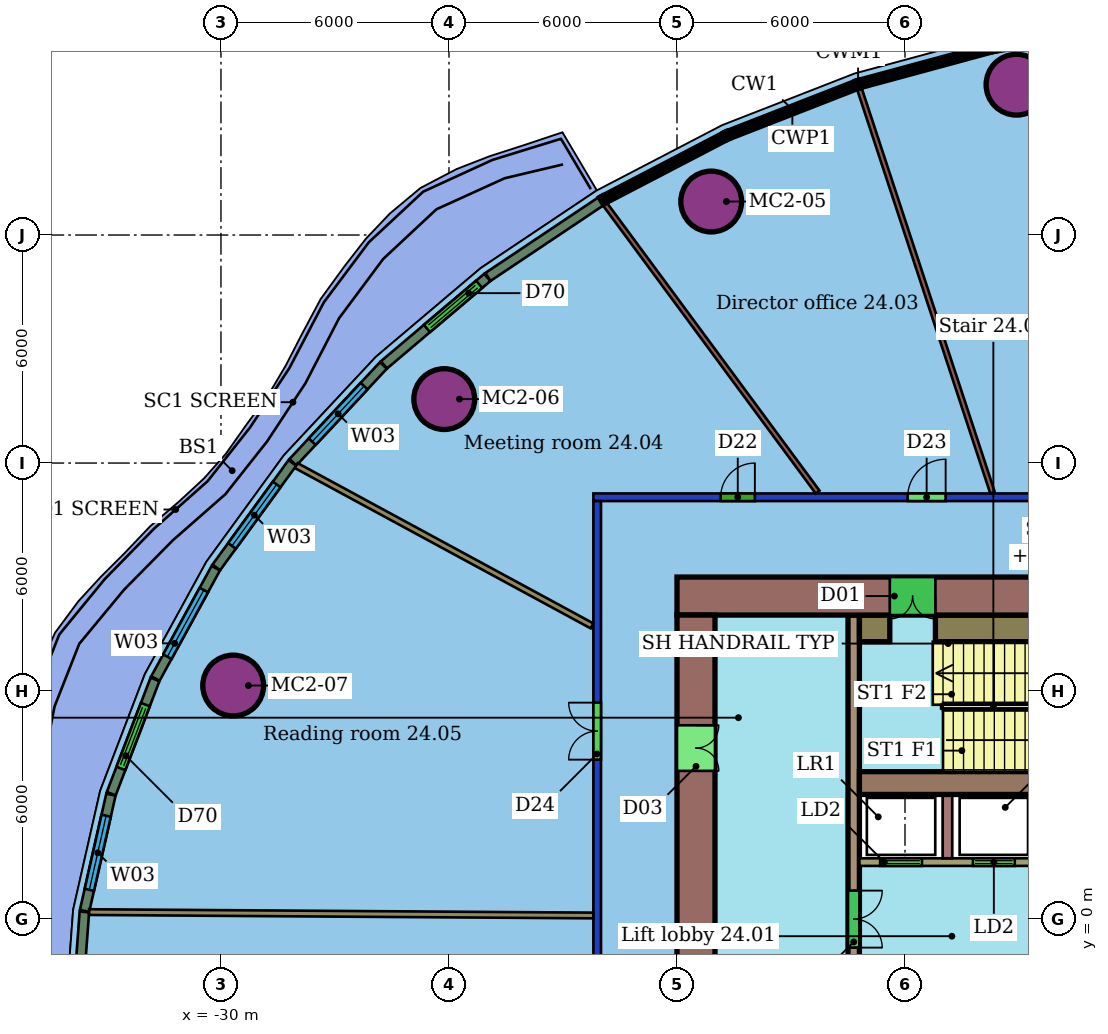
"""IFC4 building model, lengths in metres.
Left out: names, types, materials, properties, quantities, classifications, styles, units other than length and angle.
Written with IfcOpenShell. Run it as: python <this file> out.ifc"""

import sys

from ifc_helpers import new_model, si_unit, direction, frame, frame_2d, origin, origin_2d, place, context, subcontext, project, spatial, rectangle, hollow_circle, extrude, element, fill, save


model = new_model("IFC4")
c1 = context("Model", 3, precision=1e-05, world=origin(), true_north=direction((0.0, 1.0)))
c2 = subcontext(c1, "Body", "Model", "MODEL_VIEW")
j1 = project(units=[si_unit("LENGTHUNIT", "METRE"), si_unit("PLANEANGLEUNIT", "RADIAN")], contexts=[c1])
p1 = place(None, origin())
s1 = spatial("IfcSite", under=j1, at=p1, CompositionType="ELEMENT")
p2 = place(p1, origin())
s2 = spatial("IfcBuilding", under=s1, at=p2, CompositionType="ELEMENT")
p3 = place(p2, frame((0.0, 0.0, 106.6)))
s3 = spatial("IfcBuildingStorey", under=s2, at=p3, CompositionType="ELEMENT", Elevation=106.6)
for number, where, z_axis, x_axis in (
    (1, (-9.066, 21.956, 0.0), (0.0, 0.0, 1.0), (1.0, 0.0, 0.0)),
    (2, (-17.1, 18.881, 0.0), (0.0, 0.0, 1.0), (1.0, 0.0, 0.0)),
    (3, (-24.125, 13.683, 0.0), (0.0, 0.0, 1.0), (1.0, 0.0, 0.0)),
    (4, (-29.679, 6.146, 0.0), (0.0, 0.0, 1.0), (1.0, 0.0, 0.0)),
):
    element("IfcColumn", number, at=place(p3, frame(where, z_axis=z_axis, x_axis=x_axis)), inside=s3, PredefinedType="COLUMN", context=c2, shape_type="SweptSolid", body=[
        extrude(hollow_circle(Radius=0.8, WallThickness=0.055, at=origin_2d()), origin(), (0.0, 0.0, 1.0), 3.45),
    ])
p4 = place(p3, frame((-20.1, -11.0, 0.0), z_axis=(0.0, 0.0, 1.0), x_axis=(0.0, 1.0, 0.0)))
e5 = element("IfcWall", 5, at=p4, inside=s3, PredefinedType="PARTITIONING", context=c2, shape_type="SweptSolid", body=[
    extrude(rectangle(XDim=22.0, YDim=0.2, at=frame_2d((11.0, 0.0))), origin(), (0.0, 0.0, 1.0), 3.0),
])
p5 = place(p4, frame((15.196, 0.0, 0.0)))
e6 = element("IfcOpeningElement", 6, at=p5, cuts=e5, PredefinedType="OPENING", context=c2, shape_type="SweptSolid", body=[
    extrude(rectangle(XDim=1.5, YDim=2.1, at=frame_2d((0.75, 1.05))), frame((0.0, 0.11, 0.0), z_axis=(0.0, -1.0, 0.0), x_axis=(1.0, 0.0, 0.0)), (0.0, 0.0, 1.0), 0.22),
])
p6 = place(p4, frame((8.793, 0.0, 0.0)))
e7 = element("IfcOpeningElement", 7, at=p6, cuts=e5, PredefinedType="OPENING", context=c2, shape_type="SweptSolid", body=[
    extrude(rectangle(XDim=0.9, YDim=2.1, at=frame_2d((0.45, 1.05))), frame((0.0, 0.11, 0.0), z_axis=(0.0, -1.0, 0.0), x_axis=(1.0, 0.0, 0.0)), (0.0, 0.0, 1.0), 0.22),
])
p7 = place(p4, frame((4.634, 0.0, 0.0)))
e8 = element("IfcOpeningElement", 8, at=p7, cuts=e5, PredefinedType="OPENING", context=c2, shape_type="SweptSolid", body=[
    extrude(rectangle(XDim=1.0, YDim=2.1, at=frame_2d((0.5, 1.05))), frame((0.0, 0.11, 0.0), z_axis=(0.0, -1.0, 0.0), x_axis=(1.0, 0.0, 0.0)), (0.0, 0.0, 1.0), 0.22),
])
p8 = place(p3, frame((-20.2, 11.1, 0.0), z_axis=(0.0, 0.0, 1.0), x_axis=(1.0, 0.0, 0.0)))
e9 = element("IfcWall", 9, at=p8, inside=s3, PredefinedType="PARTITIONING", context=c2, shape_type="SweptSolid", body=[
    extrude(rectangle(XDim=28.4, YDim=0.2, at=frame_2d((14.2, 0.0))), origin(), (0.0, 0.0, 1.0), 3.0),
])
p9 = place(p8, frame((21.746, 0.0, 0.0)))
e10 = element("IfcOpeningElement", 10, at=p9, cuts=e9, PredefinedType="OPENING", context=c2, shape_type="SweptSolid", body=[
    extrude(rectangle(XDim=1.8, YDim=2.1, at=frame_2d((0.9, 1.05))), frame((0.0, 0.11, 0.0), z_axis=(0.0, -1.0, 0.0), x_axis=(1.0, 0.0, 0.0)), (0.0, 0.0, 1.0), 0.22),
])
p10 = place(p8, frame((15.894, 0.0, 0.0)))
e11 = element("IfcOpeningElement", 11, at=p10, cuts=e9, PredefinedType="OPENING", context=c2, shape_type="SweptSolid", body=[
    extrude(rectangle(XDim=1.0, YDim=2.1, at=frame_2d((0.5, 1.05))), frame((0.0, 0.11, 0.0), z_axis=(0.0, -1.0, 0.0), x_axis=(1.0, 0.0, 0.0)), (0.0, 0.0, 1.0), 0.22),
])
p11 = place(p8, frame((8.27, 0.0, 0.0)))
e12 = element("IfcOpeningElement", 12, at=p11, cuts=e9, PredefinedType="OPENING", context=c2, shape_type="SweptSolid", body=[
    extrude(rectangle(XDim=1.0, YDim=2.4, at=frame_2d((0.5, 1.2))), frame((0.0, 0.11, 0.0), z_axis=(0.0, -1.0, 0.0), x_axis=(1.0, 0.0, 0.0)), (0.0, 0.0, 1.0), 0.22),
])
p12 = place(p8, frame((3.349, 0.0, 0.0)))
e13 = element("IfcOpeningElement", 13, at=p12, cuts=e9, PredefinedType="OPENING", context=c2, shape_type="SweptSolid", body=[
    extrude(rectangle(XDim=0.9, YDim=2.1, at=frame_2d((0.45, 1.05))), frame((0.0, 0.11, 0.0), z_axis=(0.0, -1.0, 0.0), x_axis=(1.0, 0.0, 0.0)), (0.0, 0.0, 1.0), 0.22),
])
p13 = place(p3, frame((-13.199, 21.845, 0.0), z_axis=(0.0, 0.0, 1.0), x_axis=(0.31298520813, -0.949758000489, 0.0)))
e14 = element("IfcWall", 14, at=p13, inside=s3, PredefinedType="PARTITIONING", context=c2, shape_type="SweptSolid", body=[
    extrude(rectangle(XDim=11.187, YDim=0.125, at=frame_2d((5.594, 0.0))), origin(), (0.0, 0.0, 1.0), 3.45),
])
p14 = place(p3, frame((-19.893, 18.809, 0.0), z_axis=(0.0, 0.0, 1.0), x_axis=(0.594128493207, -0.804370147109, 0.0)))
e15 = element("IfcWall", 15, at=p14, inside=s3, PredefinedType="PARTITIONING", context=c2, shape_type="SweptSolid", body=[
    extrude(rectangle(XDim=9.413, YDim=0.125, at=frame_2d((4.707, 0.0))), origin(), (0.0, 0.0, 1.0), 3.45),
])
p15 = place(p3, frame((-28.018, 11.933, 0.0), z_axis=(0.0, 0.0, 1.0), x_axis=(0.879177388761, -0.476494616015, 0.0)))
e16 = element("IfcWall", 16, at=p15, inside=s3, PredefinedType="PARTITIONING", context=c2, shape_type="SweptSolid", body=[
    extrude(rectangle(XDim=8.851, YDim=0.15, at=frame_2d((4.426, 0.0))), origin(), (0.0, 0.0, 1.0), 3.45),
])
p16 = place(p3, frame((-33.469, 0.184, 0.0), z_axis=(0.0, 0.0, 1.0), x_axis=(0.999977573626, -0.00669718191, 0.0)))
e17 = element("IfcWall", 17, at=p16, inside=s3, PredefinedType="PARTITIONING", context=c2, shape_type="SweptSolid", body=[
    extrude(rectangle(XDim=13.269, YDim=0.15, at=frame_2d((6.635, 0.0))), origin(), (0.0, 0.0, 1.0), 3.45),
])
p17 = place(p3, frame((-20.002, 18.886, 0.0), z_axis=(0.0, 0.0, 1.0), x_axis=(-0.83113537962, -0.556070122146, 0.0)))
e18 = element("IfcWall", 18, at=p17, inside=s3, PredefinedType="SOLIDWALL", context=c2, shape_type="SweptSolid", body=[
    extrude(rectangle(XDim=3.576, YDim=0.25, at=frame_2d((1.788, 0.0))), origin(), (0.0, 0.0, 1.0), 3.05),
])
p18 = place(p3, frame((-22.992, 16.884, 0.0), z_axis=(0.0, 0.0, 1.0), x_axis=(-0.763331662342, -0.646006790418, 0.0)))
e19 = element("IfcWall", 19, at=p18, inside=s3, PredefinedType="SOLIDWALL", context=c2, shape_type="SweptSolid", body=[
    extrude(rectangle(XDim=3.56, YDim=0.25, at=frame_2d((1.78, 0.0))), origin(), (0.0, 0.0, 1.0), 3.05),
])
p19 = place(p18, frame((0.28, 0.0, 0.0)))
e20 = element("IfcOpeningElement", 20, at=p19, cuts=e19, PredefinedType="OPENING", context=c2, shape_type="SweptSolid", body=[
    extrude(rectangle(XDim=1.8, YDim=2.4, at=frame_2d((0.9, 1.2))), frame((0.0, 0.135, 0.0), z_axis=(0.0, -1.0, 0.0), x_axis=(1.0, 0.0, 0.0)), (0.0, 0.0, 1.0), 0.27),
])
p20 = place(p3, frame((-25.726, 14.568, 0.0), z_axis=(0.0, 0.0, 1.0), x_axis=(-0.68271241641, -0.730687181002, 0.0)))
e21 = element("IfcWall", 21, at=p20, inside=s3, PredefinedType="SOLIDWALL", context=c2, shape_type="SweptSolid", body=[
    extrude(rectangle(XDim=3.486, YDim=0.25, at=frame_2d((1.743, 0.0))), origin(), (0.0, 0.0, 1.0), 3.05),
])
p21 = place(p20, frame((0.743, 0.0, 0.9)))
e22 = element("IfcOpeningElement", 22, at=p21, cuts=e21, PredefinedType="OPENING", context=c2, shape_type="SweptSolid", body=[
    extrude(rectangle(XDim=2.0, YDim=2.1, at=frame_2d((1.0, 1.05))), frame((0.0, 0.135, 0.0), z_axis=(0.0, -1.0, 0.0), x_axis=(1.0, 0.0, 0.0)), (0.0, 0.0, 1.0), 0.27),
])
p22 = place(p3, frame((-28.121, 12.003, 0.0), z_axis=(0.0, 0.0, 1.0), x_axis=(-0.588602739614, -0.808422423563, 0.0)))
e23 = element("IfcWall", 23, at=p22, inside=s3, PredefinedType="SOLIDWALL", context=c2, shape_type="SweptSolid", body=[
    extrude(rectangle(XDim=3.401, YDim=0.25, at=frame_2d((1.7, 0.0))), origin(), (0.0, 0.0, 1.0), 3.05),
])
p23 = place(p22, frame((0.7, 0.0, 0.9)))
e24 = element("IfcOpeningElement", 24, at=p23, cuts=e23, PredefinedType="OPENING", context=c2, shape_type="SweptSolid", body=[
    extrude(rectangle(XDim=2.0, YDim=2.1, at=frame_2d((1.0, 1.05))), frame((0.0, 0.135, 0.0), z_axis=(0.0, -1.0, 0.0), x_axis=(1.0, 0.0, 0.0)), (0.0, 0.0, 1.0), 0.27),
])
p24 = place(p3, frame((-30.135, 9.234, 0.0), z_axis=(0.0, 0.0, 1.0), x_axis=(-0.48026734168, -0.877122158263, 0.0)))
e25 = element("IfcWall", 25, at=p24, inside=s3, PredefinedType="SOLIDWALL", context=c2, shape_type="SweptSolid", body=[
    extrude(rectangle(XDim=3.31, YDim=0.25, at=frame_2d((1.655, 0.0))), origin(), (0.0, 0.0, 1.0), 3.05),
])
p25 = place(p24, frame((0.655, 0.0, 0.9)))
e26 = element("IfcOpeningElement", 26, at=p25, cuts=e25, PredefinedType="OPENING", context=c2, shape_type="SweptSolid", body=[
    extrude(rectangle(XDim=2.0, YDim=2.1, at=frame_2d((1.0, 1.05))), frame((0.0, 0.135, 0.0), z_axis=(0.0, -1.0, 0.0), x_axis=(1.0, 0.0, 0.0)), (0.0, 0.0, 1.0), 0.27),
])
p26 = place(p3, frame((-31.736, 6.307, 0.0), z_axis=(0.0, 0.0, 1.0), x_axis=(-0.357678213507, -0.933844899104, 0.0)))
e27 = element("IfcWall", 27, at=p26, inside=s3, PredefinedType="SOLIDWALL", context=c2, shape_type="SweptSolid", body=[
    extrude(rectangle(XDim=3.22, YDim=0.25, at=frame_2d((1.61, 0.0))), origin(), (0.0, 0.0, 1.0), 3.05),
])
p27 = place(p26, frame((0.71, 0.0, 0.0)))
e28 = element("IfcOpeningElement", 28, at=p27, cuts=e27, PredefinedType="OPENING", context=c2, shape_type="SweptSolid", body=[
    extrude(rectangle(XDim=1.8, YDim=2.4, at=frame_2d((0.9, 1.2))), frame((0.0, 0.135, 0.0), z_axis=(0.0, -1.0, 0.0), x_axis=(1.0, 0.0, 0.0)), (0.0, 0.0, 1.0), 0.27),
])
p28 = place(p3, frame((-32.895, 3.275, 0.0), z_axis=(0.0, 0.0, 1.0), x_axis=(-0.221533658601, -0.975152725529, 0.0)))
e29 = element("IfcWall", 29, at=p28, inside=s3, PredefinedType="SOLIDWALL", context=c2, shape_type="SweptSolid", body=[
    extrude(rectangle(XDim=3.137, YDim=0.25, at=frame_2d((1.569, 0.0))), origin(), (0.0, 0.0, 1.0), 3.05),
])
p29 = place(p28, frame((0.569, 0.0, 0.9)))
e30 = element("IfcOpeningElement", 30, at=p29, cuts=e29, PredefinedType="OPENING", context=c2, shape_type="SweptSolid", body=[
    extrude(rectangle(XDim=2.0, YDim=2.1, at=frame_2d((1.0, 1.05))), frame((0.0, 0.135, 0.0), z_axis=(0.0, -1.0, 0.0), x_axis=(1.0, 0.0, 0.0)), (0.0, 0.0, 1.0), 0.27),
])
p30 = place(p3, frame((-33.594, 0.189, 0.0), z_axis=(0.0, 0.0, 1.0), x_axis=(-0.074290620375, -0.997236633766, 0.0)))
e31 = element("IfcWall", 31, at=p30, inside=s3, PredefinedType="SOLIDWALL", context=c2, shape_type="SweptSolid", body=[
    extrude(rectangle(XDim=3.027, YDim=0.25, at=frame_2d((1.513, 0.0))), origin(), (0.0, 0.0, 1.0), 3.05),
])
p31 = place(p3, frame((-6.0, 8.5, 0.0), z_axis=(0.0, 0.0, 1.0), x_axis=(-1.0, 0.0, 0.0)))
e32 = element("IfcWall", 32, at=p31, inside=s3, PredefinedType="SHEAR", context=c2, shape_type="SweptSolid", body=[
    extrude(rectangle(XDim=12.0, YDim=1.0, at=frame_2d((6.0, 0.0))), origin(), (0.0, 0.0, 1.0), 3.3),
])
p32 = place(p31, frame((5.2, 0.0, 0.0)))
e33 = element("IfcOpeningElement", 33, at=p32, cuts=e32, PredefinedType="OPENING", context=c2, shape_type="SweptSolid", body=[
    extrude(rectangle(XDim=1.2, YDim=2.1, at=frame_2d((0.6, 1.05))), frame((0.0, 0.51, 0.0), z_axis=(0.0, -1.0, 0.0), x_axis=(1.0, 0.0, 0.0)), (0.0, 0.0, 1.0), 1.02),
])
p33 = place(p3, frame((-17.5, 8.0, 0.0), z_axis=(0.0, 0.0, 1.0), x_axis=(0.0, -1.0, 0.0)))
e34 = element("IfcWall", 34, at=p33, inside=s3, PredefinedType="SHEAR", context=c2, shape_type="SweptSolid", body=[
    extrude(rectangle(XDim=16.0, YDim=1.0, at=frame_2d((8.0, 0.0))), origin(), (0.0, 0.0, 1.0), 3.3),
])
p34 = place(p33, frame((11.9, 0.0, 0.0)))
e35 = element("IfcOpeningElement", 35, at=p34, cuts=e34, PredefinedType="OPENING", context=c2, shape_type="SweptSolid", body=[
    extrude(rectangle(XDim=1.2, YDim=2.1, at=frame_2d((0.6, 1.05))), frame((0.0, 0.51, 0.0), z_axis=(0.0, -1.0, 0.0), x_axis=(1.0, 0.0, 0.0)), (0.0, 0.0, 1.0), 1.02),
])
p35 = place(p33, frame((2.9, 0.0, 0.0)))
e36 = element("IfcOpeningElement", 36, at=p35, cuts=e34, PredefinedType="OPENING", context=c2, shape_type="SweptSolid", body=[
    extrude(rectangle(XDim=1.2, YDim=2.1, at=frame_2d((0.6, 1.05))), frame((0.0, 0.51, 0.0), z_axis=(0.0, -1.0, 0.0), x_axis=(1.0, 0.0, 0.0)), (0.0, 0.0, 1.0), 1.02),
])
p36 = place(p3, frame((-13.2, 3.58, 0.0), z_axis=(0.0, 0.0, 1.0), x_axis=(1.0, 0.0, 0.0)))
e37 = element("IfcWall", 37, at=p36, inside=s3, PredefinedType="SHEAR", context=c2, shape_type="SweptSolid", body=[
    extrude(rectangle(XDim=7.2, YDim=0.6, at=frame_2d((3.6, 0.0))), origin(), (0.0, 0.0, 1.0), 3.3),
])
p37 = place(p3, frame((-13.35, 8.0, 0.0), z_axis=(0.0, 0.0, 1.0), x_axis=(0.0, -1.0, 0.0)))
e38 = element("IfcWall", 38, at=p37, inside=s3, PredefinedType="SHEAR", context=c2, shape_type="SweptSolid", body=[
    extrude(rectangle(XDim=16.0, YDim=0.3, at=frame_2d((8.0, 0.0))), origin(), (0.0, 0.0, 1.0), 3.3),
])
p38 = place(p37, frame((7.25, 0.0, 0.0)))
e39 = element("IfcOpeningElement", 39, at=p38, cuts=e38, PredefinedType="OPENING", context=c2, shape_type="SweptSolid", body=[
    extrude(rectangle(XDim=1.5, YDim=2.1, at=frame_2d((0.75, 1.05))), frame((0.0, 0.16, 0.0), z_axis=(0.0, -1.0, 0.0), x_axis=(1.0, 0.0, 0.0)), (0.0, 0.0, 1.0), 0.32),
])
p39 = place(p3, frame((-13.2, 1.5, 0.0), z_axis=(0.0, 0.0, 1.0), x_axis=(1.0, 0.0, 0.0)))
e40 = element("IfcWall", 40, at=p39, inside=s3, PredefinedType="SHEAR", context=c2, shape_type="SweptSolid", body=[
    extrude(rectangle(XDim=14.4, YDim=0.2, at=frame_2d((7.2, 0.0))), origin(), (0.0, 0.0, 1.0), 3.3),
])
p40 = place(p39, frame((0.546, 0.0, 0.0)))
e41 = element("IfcOpeningElement", 41, at=p40, cuts=e40, PredefinedType="OPENING", context=c2, shape_type="SweptSolid", body=[
    extrude(rectangle(XDim=1.1, YDim=2.1, at=frame_2d((0.55, 1.05))), frame((0.0, 0.11, 0.0), z_axis=(0.0, -1.0, 0.0), x_axis=(1.0, 0.0, 0.0)), (0.0, 0.0, 1.0), 0.22),
])
p41 = place(p39, frame((2.988, 0.0, 0.0)))
e42 = element("IfcOpeningElement", 42, at=p41, cuts=e40, PredefinedType="OPENING", context=c2, shape_type="SweptSolid", body=[
    extrude(rectangle(XDim=1.1, YDim=2.1, at=frame_2d((0.55, 1.05))), frame((0.0, 0.11, 0.0), z_axis=(0.0, -1.0, 0.0), x_axis=(1.0, 0.0, 0.0)), (0.0, 0.0, 1.0), 0.22),
])
p42 = place(p39, frame((5.429, 0.0, 0.0)))
e43 = element("IfcOpeningElement", 43, at=p42, cuts=e40, PredefinedType="OPENING", context=c2, shape_type="SweptSolid", body=[
    extrude(rectangle(XDim=1.1, YDim=2.1, at=frame_2d((0.55, 1.05))), frame((0.0, 0.11, 0.0), z_axis=(0.0, -1.0, 0.0), x_axis=(1.0, 0.0, 0.0)), (0.0, 0.0, 1.0), 0.22),
])
p43 = place(p39, frame((7.871, 0.0, 0.0)))
e44 = element("IfcOpeningElement", 44, at=p43, cuts=e40, PredefinedType="OPENING", context=c2, shape_type="SweptSolid", body=[
    extrude(rectangle(XDim=1.1, YDim=2.1, at=frame_2d((0.55, 1.05))), frame((0.0, 0.11, 0.0), z_axis=(0.0, -1.0, 0.0), x_axis=(1.0, 0.0, 0.0)), (0.0, 0.0, 1.0), 0.22),
])
p44 = place(p39, frame((13.35, 0.0, 0.0)))
e45 = element("IfcOpeningElement", 45, at=p44, cuts=e40, PredefinedType="OPENING", context=c2, shape_type="SweptSolid", body=[
    extrude(rectangle(XDim=0.9, YDim=2.1, at=frame_2d((0.45, 1.05))), frame((0.0, 0.11, 0.0), z_axis=(0.0, -1.0, 0.0), x_axis=(1.0, 0.0, 0.0)), (0.0, 0.0, 1.0), 0.22),
])
p45 = place(p3, frame((-13.2, 7.65, 0.0), z_axis=(0.0, 0.0, 1.0), x_axis=(1.0, 0.0, 0.0)))
e46 = element("IfcWall", 46, at=p45, inside=s3, PredefinedType="SHEAR", context=c2, shape_type="SweptSolid", body=[
    extrude(rectangle(XDim=0.8, YDim=0.7, at=frame_2d((0.4, 0.0))), origin(), (0.0, 0.0, 1.0), 3.3),
])
p46 = place(p3, frame((-11.2, 7.65, 0.0), z_axis=(0.0, 0.0, 1.0), x_axis=(1.0, 0.0, 0.0)))
e47 = element("IfcWall", 47, at=p46, inside=s3, PredefinedType="SHEAR", context=c2, shape_type="SweptSolid", body=[
    extrude(rectangle(XDim=5.05, YDim=0.7, at=frame_2d((2.525, 0.0))), origin(), (0.0, 0.0, 1.0), 3.3),
])
p47 = place(p3, frame((-10.883, 1.6, 0.0), z_axis=(0.0, 0.0, 1.0), x_axis=(0.0, 1.0, 0.0)))
e48 = element("IfcWall", 48, at=p47, inside=s3, PredefinedType="SHEAR", context=c2, shape_type="SweptSolid", body=[
    extrude(rectangle(XDim=1.68, YDim=0.25, at=frame_2d((0.84, 0.0))), origin(), (0.0, 0.0, 1.0), 3.3),
])
p48 = place(p11, origin())
e49 = element("IfcDoor", 49, at=p48, inside=s3, OperationType="SINGLE_SWING_RIGHT", PredefinedType="DOOR", context=c2, shape_type="SweptSolid", body=[
    extrude(rectangle(XDim=1.0, YDim=2.4, at=frame_2d((0.5, 1.2))), frame((0.0, 0.025, 0.0), z_axis=(0.0, -1.0, 0.0), x_axis=(1.0, 0.0, 0.0)), (0.0, 0.0, 1.0), 0.05),
])
fill(e12, e49)
p49 = place(p12, origin())
e50 = element("IfcDoor", 50, at=p49, inside=s3, OperationType="SINGLE_SWING_RIGHT", PredefinedType="DOOR", context=c2, shape_type="SweptSolid", body=[
    extrude(rectangle(XDim=0.9, YDim=2.1, at=frame_2d((0.45, 1.05))), frame((0.0, 0.025, 0.0), z_axis=(0.0, -1.0, 0.0), x_axis=(1.0, 0.0, 0.0)), (0.0, 0.0, 1.0), 0.05),
])
fill(e13, e50)
p50 = place(p5, origin())
e51 = element("IfcDoor", 51, at=p50, inside=s3, OperationType="DOUBLE_DOOR_SINGLE_SWING", PredefinedType="DOOR", context=c2, shape_type="SweptSolid", body=[
    extrude(rectangle(XDim=1.5, YDim=2.1, at=frame_2d((0.75, 1.05))), frame((0.0, 0.025, 0.0), z_axis=(0.0, -1.0, 0.0), x_axis=(1.0, 0.0, 0.0)), (0.0, 0.0, 1.0), 0.05),
])
fill(e6, e51)
p51 = place(p19, origin())
e52 = element("IfcDoor", 52, at=p51, inside=s3, OperationType="DOUBLE_DOOR_SLIDING", PredefinedType="DOOR", context=c2, shape_type="SweptSolid", body=[
    extrude(rectangle(XDim=1.8, YDim=2.4, at=frame_2d((0.9, 1.2))), frame((0.0, 0.025, 0.0), z_axis=(0.0, -1.0, 0.0), x_axis=(1.0, 0.0, 0.0)), (0.0, 0.0, 1.0), 0.05),
])
fill(e20, e52)
p52 = place(p21, origin())
e53 = element("IfcWindow", 53, at=p52, inside=s3, PartitioningType="SINGLE_PANEL", PredefinedType="WINDOW", context=c2, shape_type="SweptSolid", body=[
    extrude(rectangle(XDim=2.0, YDim=2.1, at=frame_2d((1.0, 1.05))), frame((0.0, 0.03, 0.0), z_axis=(0.0, -1.0, 0.0), x_axis=(1.0, 0.0, 0.0)), (0.0, 0.0, 1.0), 0.06),
])
fill(e22, e53)
p53 = place(p23, origin())
e54 = element("IfcWindow", 54, at=p53, inside=s3, PartitioningType="SINGLE_PANEL", PredefinedType="WINDOW", context=c2, shape_type="SweptSolid", body=[
    extrude(rectangle(XDim=2.0, YDim=2.1, at=frame_2d((1.0, 1.05))), frame((0.0, 0.03, 0.0), z_axis=(0.0, -1.0, 0.0), x_axis=(1.0, 0.0, 0.0)), (0.0, 0.0, 1.0), 0.06),
])
fill(e24, e54)
p54 = place(p25, origin())
e55 = element("IfcWindow", 55, at=p54, inside=s3, PartitioningType="SINGLE_PANEL", PredefinedType="WINDOW", context=c2, shape_type="SweptSolid", body=[
    extrude(rectangle(XDim=2.0, YDim=2.1, at=frame_2d((1.0, 1.05))), frame((0.0, 0.03, 0.0), z_axis=(0.0, -1.0, 0.0), x_axis=(1.0, 0.0, 0.0)), (0.0, 0.0, 1.0), 0.06),
])
fill(e26, e55)
p55 = place(p27, origin())
e56 = element("IfcDoor", 56, at=p55, inside=s3, OperationType="DOUBLE_DOOR_SLIDING", PredefinedType="DOOR", context=c2, shape_type="SweptSolid", body=[
    extrude(rectangle(XDim=1.8, YDim=2.4, at=frame_2d((0.9, 1.2))), frame((0.0, 0.025, 0.0), z_axis=(0.0, -1.0, 0.0), x_axis=(1.0, 0.0, 0.0)), (0.0, 0.0, 1.0), 0.05),
])
fill(e28, e56)
p56 = place(p29, origin())
e57 = element("IfcWindow", 57, at=p56, inside=s3, PartitioningType="SINGLE_PANEL", PredefinedType="WINDOW", context=c2, shape_type="SweptSolid", body=[
    extrude(rectangle(XDim=2.0, YDim=2.1, at=frame_2d((1.0, 1.05))), frame((0.0, 0.03, 0.0), z_axis=(0.0, -1.0, 0.0), x_axis=(1.0, 0.0, 0.0)), (0.0, 0.0, 1.0), 0.06),
])
fill(e30, e57)
p57 = place(p32, origin())
e58 = element("IfcDoor", 58, at=p57, inside=s3, OperationType="DOUBLE_DOOR_SINGLE_SWING", PredefinedType="NOTDEFINED", context=c2, shape_type="SweptSolid", body=[
    extrude(rectangle(XDim=1.2, YDim=2.1, at=frame_2d((0.6, 1.05))), frame((0.0, 0.025, 0.0), z_axis=(0.0, -1.0, 0.0), x_axis=(1.0, 0.0, 0.0)), (0.0, 0.0, 1.0), 0.05),
])
fill(e33, e58)
p58 = place(p35, origin())
e59 = element("IfcDoor", 59, at=p58, inside=s3, OperationType="DOUBLE_DOOR_SINGLE_SWING", PredefinedType="NOTDEFINED", context=c2, shape_type="SweptSolid", body=[
    extrude(rectangle(XDim=1.2, YDim=2.1, at=frame_2d((0.6, 1.05))), frame((0.0, 0.025, 0.0), z_axis=(0.0, -1.0, 0.0), x_axis=(1.0, 0.0, 0.0)), (0.0, 0.0, 1.0), 0.05),
])
fill(e36, e59)
p59 = place(p38, origin())
e60 = element("IfcDoor", 60, at=p59, inside=s3, OperationType="DOUBLE_DOOR_SINGLE_SWING", PredefinedType="NOTDEFINED", context=c2, shape_type="SweptSolid", body=[
    extrude(rectangle(XDim=1.5, YDim=2.1, at=frame_2d((0.75, 1.05))), frame((0.0, 0.025, 0.0), z_axis=(0.0, -1.0, 0.0), x_axis=(1.0, 0.0, 0.0)), (0.0, 0.0, 1.0), 0.05),
])
fill(e39, e60)
p60 = place(p40, origin())
e61 = element("IfcDoor", 61, at=p60, inside=s3, OperationType="DOUBLE_DOOR_SLIDING", PredefinedType="NOTDEFINED", context=c2, shape_type="SweptSolid", body=[
    extrude(rectangle(XDim=1.1, YDim=2.1, at=frame_2d((0.55, 1.05))), frame((0.0, 0.025, 0.0), z_axis=(0.0, -1.0, 0.0), x_axis=(1.0, 0.0, 0.0)), (0.0, 0.0, 1.0), 0.05),
])
fill(e41, e61)
p61 = place(p41, origin())
e62 = element("IfcDoor", 62, at=p61, inside=s3, OperationType="DOUBLE_DOOR_SLIDING", PredefinedType="NOTDEFINED", context=c2, shape_type="SweptSolid", body=[
    extrude(rectangle(XDim=1.1, YDim=2.1, at=frame_2d((0.55, 1.05))), frame((0.0, 0.025, 0.0), z_axis=(0.0, -1.0, 0.0), x_axis=(1.0, 0.0, 0.0)), (0.0, 0.0, 1.0), 0.05),
])
fill(e42, e62)
save(model, sys.argv[1])
